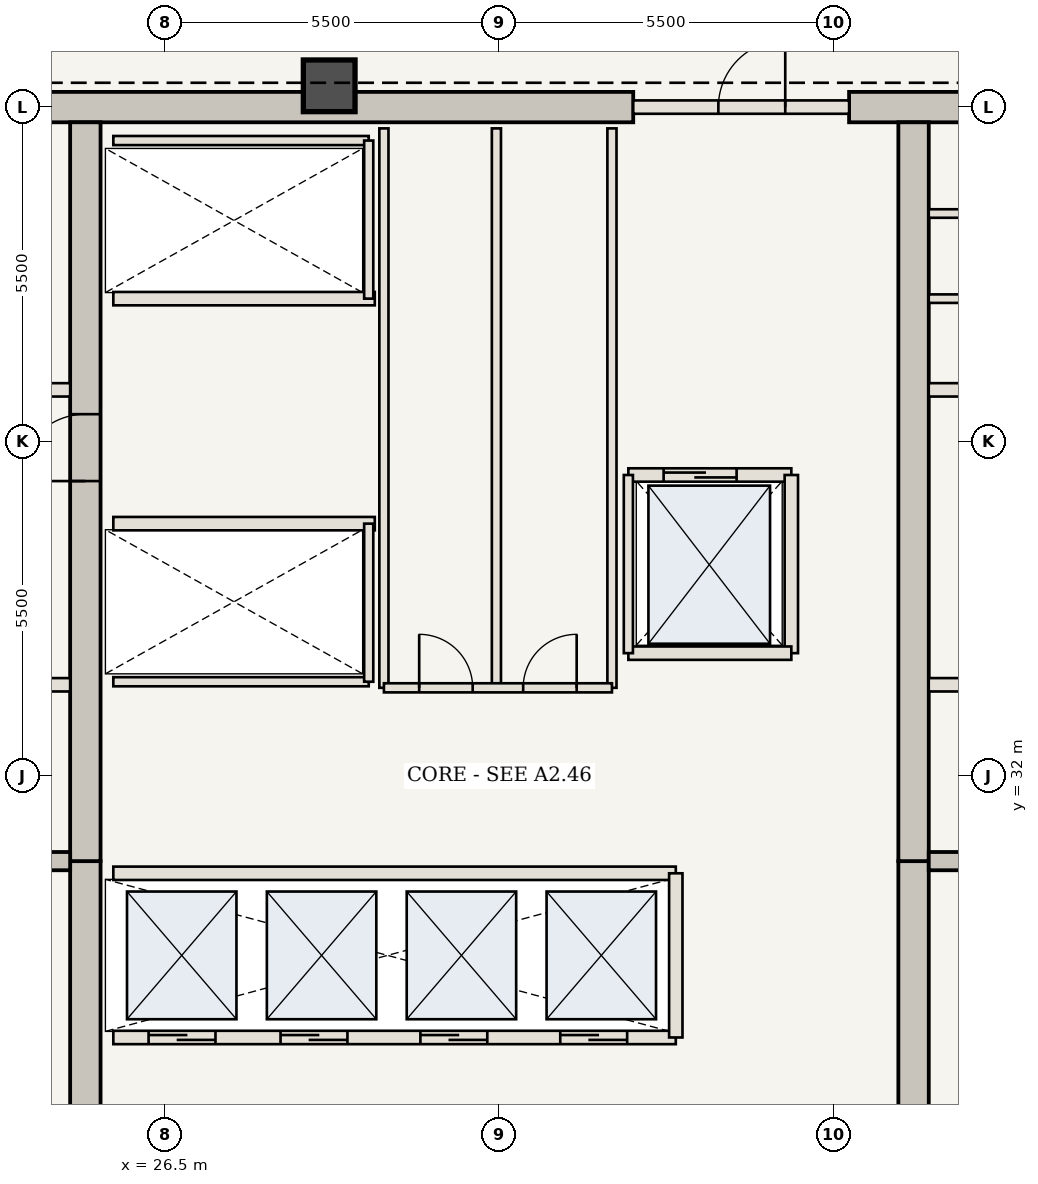
"""IFC4 building model, lengths in metres.
Left out: names, types, materials, properties, quantities, classifications, styles, units other than length and angle.
Written with IfcOpenShell. Run it as: python <this file> out.ifc"""

import sys

from ifc_helpers import new_model, si_unit, direction, frame, frame_2d, origin, origin_2d, place, context, subcontext, project, spatial, rectangle, extrude, element, fill, save


model = new_model("IFC4")
c1 = context("Model", 3, precision=1e-05, world=origin(), true_north=direction((0.0, 1.0)))
c2 = subcontext(c1, "Body", "Model", "MODEL_VIEW")
j1 = project(units=[si_unit("LENGTHUNIT", "METRE"), si_unit("PLANEANGLEUNIT", "RADIAN")], contexts=[c1])
p1 = place(None, origin())
s1 = spatial("IfcSite", under=j1, at=p1, CompositionType="ELEMENT")
p2 = place(p1, origin())
s2 = spatial("IfcBuilding", under=s1, at=p2, CompositionType="ELEMENT")
p3 = place(p2, frame((0.0, 0.0, 206.15)))
s3 = spatial("IfcBuildingStorey", under=s2, at=p3, CompositionType="ELEMENT", Elevation=206.15)
p4 = place(p3, frame((21.41, 43.0, 0.0), z_axis=(0.0, 0.0, 1.0), x_axis=(1.0, 0.0, 0.0)))
e1 = element("IfcWall", 1, at=p4, inside=s3, PredefinedType="SHEAR", context=c2, shape_type="SweptSolid", body=[
    extrude(rectangle(XDim=12.79, YDim=0.5, at=frame_2d((6.395, 0.0))), origin(), (0.0, 0.0, 1.0), 3.85),
])
p5 = place(p3, frame((37.75, 43.0, 0.0), z_axis=(0.0, 0.0, 1.0), x_axis=(1.0, 0.0, 0.0)))
e2 = element("IfcWall", 2, at=p5, inside=s3, PredefinedType="SHEAR", context=c2, shape_type="SweptSolid", body=[
    extrude(rectangle(XDim=4.84, YDim=0.5, at=frame_2d((2.42, 0.0))), origin(), (0.0, 0.0, 1.0), 3.85),
])
p6 = place(p3, frame((25.19, 21.2, 0.0), z_axis=(0.0, 0.0, 1.0), x_axis=(0.0, 1.0, 0.0)))
e3 = element("IfcWall", 3, at=p6, inside=s3, PredefinedType="SHEAR", context=c2, shape_type="SweptSolid", body=[
    extrude(rectangle(XDim=9.4, YDim=0.5, at=frame_2d((4.7, 0.0))), origin(), (0.0, 0.0, 1.0), 3.85),
])
p7 = place(p3, frame((25.19, 30.6, 0.0), z_axis=(0.0, 0.0, 1.0), x_axis=(0.0, 1.0, 0.0)))
e4 = element("IfcWall", 4, at=p7, inside=s3, PredefinedType="SHEAR", context=c2, shape_type="SweptSolid", body=[
    extrude(rectangle(XDim=12.15, YDim=0.5, at=frame_2d((6.075, 0.0))), origin(), (0.0, 0.0, 1.0), 3.85),
])
p8 = place(p7, frame((6.25, 0.0, 0.0)))
e5 = element("IfcOpeningElement", 5, at=p8, cuts=e4, PredefinedType="OPENING", context=c2, shape_type="SweptSolid", body=[
    extrude(rectangle(XDim=1.1, YDim=2.15, at=frame_2d((0.55, 1.075))), frame((0.0, 0.26, 0.0), z_axis=(0.0, -1.0, 0.0), x_axis=(1.0, 0.0, 0.0)), (0.0, 0.0, 1.0), 0.52),
])
p9 = place(p3, frame((38.81, 21.2, 0.0), z_axis=(0.0, 0.0, 1.0), x_axis=(0.0, 1.0, 0.0)))
e6 = element("IfcWall", 6, at=p9, inside=s3, PredefinedType="SHEAR", context=c2, shape_type="SweptSolid", body=[
    extrude(rectangle(XDim=9.4, YDim=0.5, at=frame_2d((4.7, 0.0))), origin(), (0.0, 0.0, 1.0), 3.85),
])
p10 = place(p3, frame((38.81, 30.6, 0.0), z_axis=(0.0, 0.0, 1.0), x_axis=(0.0, 1.0, 0.0)))
e7 = element("IfcWall", 7, at=p10, inside=s3, PredefinedType="SHEAR", context=c2, shape_type="SweptSolid", body=[
    extrude(rectangle(XDim=12.15, YDim=0.5, at=frame_2d((6.075, 0.0))), origin(), (0.0, 0.0, 1.0), 3.85),
])
p11 = place(p3, frame((29.2, 43.35, 0.0), z_axis=(0.0, 0.0, 1.0), x_axis=(1.0, 0.0, 0.0)))
e8 = element("IfcColumn", 8, at=p11, inside=s3, PredefinedType="COLUMN", context=c2, shape_type="SweptSolid", body=[
    extrude(rectangle(XDim=0.85, YDim=0.85, at=origin_2d()), origin(), (0.0, 0.0, 1.0), 3.85),
])
for number, where, z_axis, x_axis in (
    (9, (21.41, 30.6, 0.0), (0.0, 0.0, 1.0), (1.0, 0.0, 0.0)),
    (10, (39.06, 30.6, 0.0), (0.0, 0.0, 1.0), (1.0, 0.0, 0.0)),
):
    element("IfcWall", number, at=place(p3, frame(where, z_axis=z_axis, x_axis=x_axis)), inside=s3, PredefinedType="SHEAR", context=c2, shape_type="SweptSolid", body=[
        extrude(rectangle(XDim=3.53, YDim=0.3, at=frame_2d((1.765, 0.0))), origin(), (0.0, 0.0, 1.0), 3.685),
    ])
p12 = place(p3, frame((21.41, 33.5, 0.0), z_axis=(0.0, 0.0, 1.0), x_axis=(1.0, 0.0, 0.0)))
e11 = element("IfcWall", 11, at=p12, inside=s3, PredefinedType="STANDARD", context=c2, shape_type="SweptSolid", body=[
    extrude(rectangle(XDim=3.53, YDim=0.22, at=frame_2d((1.765, 0.0))), origin(), (0.0, 0.0, 1.0), 3.685),
])
p13 = place(p12, frame((0.75, 0.0, 0.0)))
e12 = element("IfcOpeningElement", 12, at=p13, cuts=e11, PredefinedType="OPENING", context=c2, shape_type="SweptSolid", body=[
    extrude(rectangle(XDim=1.2, YDim=2.2, at=frame_2d((0.6, 1.1))), frame((0.0, 0.12, 0.0), z_axis=(0.0, -1.0, 0.0), x_axis=(1.0, 0.0, 0.0)), (0.0, 0.0, 1.0), 0.24),
])
p14 = place(p3, frame((39.06, 33.5, 0.0), z_axis=(0.0, 0.0, 1.0), x_axis=(1.0, 0.0, 0.0)))
e13 = element("IfcWall", 13, at=p14, inside=s3, PredefinedType="STANDARD", context=c2, shape_type="SweptSolid", body=[
    extrude(rectangle(XDim=3.53, YDim=0.22, at=frame_2d((1.765, 0.0))), origin(), (0.0, 0.0, 1.0), 3.685),
])
p15 = place(p14, frame((1.55, 0.0, 0.0)))
e14 = element("IfcOpeningElement", 14, at=p15, cuts=e13, PredefinedType="OPENING", context=c2, shape_type="SweptSolid", body=[
    extrude(rectangle(XDim=1.2, YDim=2.2, at=frame_2d((0.6, 1.1))), frame((0.0, 0.12, 0.0), z_axis=(0.0, -1.0, 0.0), x_axis=(1.0, 0.0, 0.0)), (0.0, 0.0, 1.0), 0.24),
])
for number, where, z_axis, x_axis in (
    (15, (21.41, 38.35, 0.0), (0.0, 0.0, 1.0), (1.0, 0.0, 0.0)),
    (16, (39.06, 38.35, 0.0), (0.0, 0.0, 1.0), (1.0, 0.0, 0.0)),
):
    element("IfcWall", number, at=place(p3, frame(where, z_axis=z_axis, x_axis=x_axis)), inside=s3, PredefinedType="STANDARD", context=c2, shape_type="SweptSolid", body=[
        extrude(rectangle(XDim=3.53, YDim=0.22, at=frame_2d((1.765, 0.0))), origin(), (0.0, 0.0, 1.0), 3.685),
    ])
for number, where, z_axis, x_axis in (
    (17, (39.06, 39.85, 0.0), (0.0, 0.0, 1.0), (1.0, 0.0, 0.0)),
    (18, (39.06, 41.25, 0.0), (0.0, 0.0, 1.0), (1.0, 0.0, 0.0)),
):
    element("IfcWall", number, at=place(p3, frame(where, z_axis=z_axis, x_axis=x_axis)), inside=s3, PredefinedType="STANDARD", context=c2, shape_type="SweptSolid", body=[
        extrude(rectangle(XDim=3.53, YDim=0.14, at=frame_2d((1.765, 0.0))), origin(), (0.0, 0.0, 1.0), 3.685),
    ])
p16 = place(p3, frame((25.65, 27.7, 0.0), z_axis=(0.0, 0.0, 1.0), x_axis=(1.0, 0.0, 0.0)))
e19 = element("IfcWall", 19, at=p16, inside=s3, PredefinedType="STANDARD", context=c2, shape_type="SweptSolid", body=[
    extrude(rectangle(XDim=9.25, YDim=0.22, at=frame_2d((4.625, 0.0))), origin(), (0.0, 0.0, 1.0), 3.685),
])
p17 = place(p16, frame((0.58, 0.0, 0.0)))
e20 = element("IfcOpeningElement", 20, at=p17, cuts=e19, PredefinedType="OPENING", context=c2, shape_type="SweptSolid", body=[
    extrude(rectangle(XDim=1.1, YDim=2.15, at=frame_2d((0.55, 1.075))), frame((0.0, 0.12, 0.0), z_axis=(0.0, -1.0, 0.0), x_axis=(1.0, 0.0, 0.0)), (0.0, 0.0, 1.0), 0.24),
])
p18 = place(p16, frame((2.75, 0.0, 0.0)))
e21 = element("IfcOpeningElement", 21, at=p18, cuts=e19, PredefinedType="OPENING", context=c2, shape_type="SweptSolid", body=[
    extrude(rectangle(XDim=1.1, YDim=2.15, at=frame_2d((0.55, 1.075))), frame((0.0, 0.12, 0.0), z_axis=(0.0, -1.0, 0.0), x_axis=(1.0, 0.0, 0.0)), (0.0, 0.0, 1.0), 0.24),
])
p19 = place(p16, frame((5.05, 0.0, 0.0)))
e22 = element("IfcOpeningElement", 22, at=p19, cuts=e19, PredefinedType="OPENING", context=c2, shape_type="SweptSolid", body=[
    extrude(rectangle(XDim=1.1, YDim=2.15, at=frame_2d((0.55, 1.075))), frame((0.0, 0.12, 0.0), z_axis=(0.0, -1.0, 0.0), x_axis=(1.0, 0.0, 0.0)), (0.0, 0.0, 1.0), 0.24),
])
p20 = place(p16, frame((7.35, 0.0, 0.0)))
e23 = element("IfcOpeningElement", 23, at=p20, cuts=e19, PredefinedType="OPENING", context=c2, shape_type="SweptSolid", body=[
    extrude(rectangle(XDim=1.1, YDim=2.15, at=frame_2d((0.55, 1.075))), frame((0.0, 0.12, 0.0), z_axis=(0.0, -1.0, 0.0), x_axis=(1.0, 0.0, 0.0)), (0.0, 0.0, 1.0), 0.24),
])
p21 = place(p3, frame((25.65, 30.4, 0.0), z_axis=(0.0, 0.0, 1.0), x_axis=(1.0, 0.0, 0.0)))
e24 = element("IfcWall", 24, at=p21, inside=s3, PredefinedType="STANDARD", context=c2, shape_type="SweptSolid", body=[
    extrude(rectangle(XDim=9.25, YDim=0.22, at=frame_2d((4.625, 0.0))), origin(), (0.0, 0.0, 1.0), 3.685),
])
p22 = place(p3, frame((34.9, 27.7, 0.0), z_axis=(0.0, 0.0, 1.0), x_axis=(0.0, 1.0, 0.0)))
e25 = element("IfcWall", 25, at=p22, inside=s3, PredefinedType="STANDARD", context=c2, shape_type="SweptSolid", body=[
    extrude(rectangle(XDim=2.7, YDim=0.22, at=frame_2d((1.35, 0.0))), origin(), (0.0, 0.0, 1.0), 3.685),
])
p23 = place(p3, frame((25.65, 36.15, 0.0), z_axis=(0.0, 0.0, 1.0), x_axis=(1.0, 0.0, 0.0)))
e26 = element("IfcWall", 26, at=p23, inside=s3, PredefinedType="STANDARD", context=c2, shape_type="SweptSolid", body=[
    extrude(rectangle(XDim=4.3, YDim=0.22, at=frame_2d((2.15, 0.0))), origin(), (0.0, 0.0, 1.0), 3.685),
])
p24 = place(p3, frame((25.65, 33.55, 0.0), z_axis=(0.0, 0.0, 1.0), x_axis=(1.0, 0.0, 0.0)))
e27 = element("IfcWall", 27, at=p24, inside=s3, PredefinedType="STANDARD", context=c2, shape_type="SweptSolid", body=[
    extrude(rectangle(XDim=4.2, YDim=0.15, at=frame_2d((2.1, 0.0))), origin(), (0.0, 0.0, 1.0), 3.685),
])
p25 = place(p3, frame((29.85, 33.55, 0.0), z_axis=(0.0, 0.0, 1.0), x_axis=(0.0, 1.0, 0.0)))
e28 = element("IfcWall", 28, at=p25, inside=s3, PredefinedType="STANDARD", context=c2, shape_type="SweptSolid", body=[
    extrude(rectangle(XDim=2.6, YDim=0.15, at=frame_2d((1.3, 0.0))), origin(), (0.0, 0.0, 1.0), 3.685),
])
p26 = place(p3, frame((25.65, 39.85, 0.0), z_axis=(0.0, 0.0, 1.0), x_axis=(1.0, 0.0, 0.0)))
e29 = element("IfcWall", 29, at=p26, inside=s3, PredefinedType="STANDARD", context=c2, shape_type="SweptSolid", body=[
    extrude(rectangle(XDim=4.3, YDim=0.22, at=frame_2d((2.15, 0.0))), origin(), (0.0, 0.0, 1.0), 3.685),
])
p27 = place(p3, frame((25.65, 42.45, 0.0), z_axis=(0.0, 0.0, 1.0), x_axis=(1.0, 0.0, 0.0)))
e30 = element("IfcWall", 30, at=p27, inside=s3, PredefinedType="STANDARD", context=c2, shape_type="SweptSolid", body=[
    extrude(rectangle(XDim=4.2, YDim=0.15, at=frame_2d((2.1, 0.0))), origin(), (0.0, 0.0, 1.0), 3.685),
])
p28 = place(p3, frame((29.85, 39.85, 0.0), z_axis=(0.0, 0.0, 1.0), x_axis=(0.0, 1.0, 0.0)))
e31 = element("IfcWall", 31, at=p28, inside=s3, PredefinedType="STANDARD", context=c2, shape_type="SweptSolid", body=[
    extrude(rectangle(XDim=2.6, YDim=0.15, at=frame_2d((1.3, 0.0))), origin(), (0.0, 0.0, 1.0), 3.685),
])
for number, where, z_axis, x_axis in (
    (32, (30.1, 33.45, 0.0), (0.0, 0.0, 1.0), (0.0, 1.0, 0.0)),
    (33, (31.95, 33.45, 0.0), (0.0, 0.0, 1.0), (0.0, 1.0, 0.0)),
    (34, (33.85, 33.45, 0.0), (0.0, 0.0, 1.0), (0.0, 1.0, 0.0)),
):
    element("IfcWall", number, at=place(p3, frame(where, z_axis=z_axis, x_axis=x_axis)), inside=s3, PredefinedType="STANDARD", context=c2, shape_type="SweptSolid", body=[
        extrude(rectangle(XDim=9.2, YDim=0.15, at=frame_2d((4.6, 0.0))), origin(), (0.0, 0.0, 1.0), 3.685),
    ])
p29 = place(p3, frame((30.1, 33.45, 0.0), z_axis=(0.0, 0.0, 1.0), x_axis=(1.0, 0.0, 0.0)))
e35 = element("IfcWall", 35, at=p29, inside=s3, PredefinedType="STANDARD", context=c2, shape_type="SweptSolid", body=[
    extrude(rectangle(XDim=3.75, YDim=0.15, at=frame_2d((1.875, 0.0))), origin(), (0.0, 0.0, 1.0), 3.685),
])
p30 = place(p29, frame((0.58, 0.0, 0.0)))
e36 = element("IfcOpeningElement", 36, at=p30, cuts=e35, PredefinedType="OPENING", context=c2, shape_type="SweptSolid", body=[
    extrude(rectangle(XDim=0.88, YDim=2.1, at=frame_2d((0.44, 1.05))), frame((0.0, 0.085, 0.0), z_axis=(0.0, -1.0, 0.0), x_axis=(1.0, 0.0, 0.0)), (0.0, 0.0, 1.0), 0.17),
])
p31 = place(p29, frame((2.29, 0.0, 0.0)))
e37 = element("IfcOpeningElement", 37, at=p31, cuts=e35, PredefinedType="OPENING", context=c2, shape_type="SweptSolid", body=[
    extrude(rectangle(XDim=0.88, YDim=2.1, at=frame_2d((0.44, 1.05))), frame((0.0, 0.085, 0.0), z_axis=(0.0, -1.0, 0.0), x_axis=(1.0, 0.0, 0.0)), (0.0, 0.0, 1.0), 0.17),
])
p32 = place(p3, frame((34.2, 43.0, 0.0), z_axis=(0.0, 0.0, 1.0), x_axis=(1.0, 0.0, 0.0)))
e38 = element("IfcWall", 38, at=p32, inside=s3, PredefinedType="STANDARD", context=c2, shape_type="SweptSolid", body=[
    extrude(rectangle(XDim=3.55, YDim=0.22, at=frame_2d((1.775, 0.0))), origin(), (0.0, 0.0, 1.0), 3.685),
])
p33 = place(p32, frame((1.4, 0.0, 0.0)))
e39 = element("IfcOpeningElement", 39, at=p33, cuts=e38, PredefinedType="OPENING", context=c2, shape_type="SweptSolid", body=[
    extrude(rectangle(XDim=1.1, YDim=2.15, at=frame_2d((0.55, 1.075))), frame((0.0, 0.12, 0.0), z_axis=(0.0, -1.0, 0.0), x_axis=(1.0, 0.0, 0.0)), (0.0, 0.0, 1.0), 0.24),
])
p34 = place(p3, frame((34.12, 36.95, 0.0), z_axis=(0.0, 0.0, 1.0), x_axis=(1.0, 0.0, 0.0)))
e40 = element("IfcWall", 40, at=p34, inside=s3, PredefinedType="STANDARD", context=c2, shape_type="SweptSolid", body=[
    extrude(rectangle(XDim=2.68, YDim=0.22, at=frame_2d((1.34, 0.0))), origin(), (0.0, 0.0, 1.0), 3.685),
])
p35 = place(p34, frame((0.58, 0.0, 0.0)))
e41 = element("IfcOpeningElement", 41, at=p35, cuts=e40, PredefinedType="OPENING", context=c2, shape_type="SweptSolid", body=[
    extrude(rectangle(XDim=1.2, YDim=2.2, at=frame_2d((0.6, 1.1))), frame((0.0, 0.12, 0.0), z_axis=(0.0, -1.0, 0.0), x_axis=(1.0, 0.0, 0.0)), (0.0, 0.0, 1.0), 0.24),
])
p36 = place(p3, frame((36.8, 34.02, 0.0), z_axis=(0.0, 0.0, 1.0), x_axis=(0.0, 1.0, 0.0)))
e42 = element("IfcWall", 42, at=p36, inside=s3, PredefinedType="STANDARD", context=c2, shape_type="SweptSolid", body=[
    extrude(rectangle(XDim=2.93, YDim=0.22, at=frame_2d((1.465, 0.0))), origin(), (0.0, 0.0, 1.0), 3.685),
])
p37 = place(p3, frame((34.12, 34.02, 0.0), z_axis=(0.0, 0.0, 1.0), x_axis=(1.0, 0.0, 0.0)))
e43 = element("IfcWall", 43, at=p37, inside=s3, PredefinedType="STANDARD", context=c2, shape_type="SweptSolid", body=[
    extrude(rectangle(XDim=2.68, YDim=0.22, at=frame_2d((1.34, 0.0))), origin(), (0.0, 0.0, 1.0), 3.685),
])
p38 = place(p3, frame((34.12, 34.02, 0.0), z_axis=(0.0, 0.0, 1.0), x_axis=(0.0, 1.0, 0.0)))
e44 = element("IfcWall", 44, at=p38, inside=s3, PredefinedType="STANDARD", context=c2, shape_type="SweptSolid", body=[
    extrude(rectangle(XDim=2.93, YDim=0.15, at=frame_2d((1.465, 0.0))), origin(), (0.0, 0.0, 1.0), 3.685),
])
p39 = place(p8, origin())
e45 = element("IfcDoor", 45, at=p39, inside=s3, OperationType="SINGLE_SWING_LEFT", PredefinedType="DOOR", context=c2, shape_type="SweptSolid", body=[
    extrude(rectangle(XDim=1.1, YDim=2.15, at=frame_2d((0.55, 1.075))), frame((0.0, 0.025, 0.0), z_axis=(0.0, -1.0, 0.0), x_axis=(1.0, 0.0, 0.0)), (0.0, 0.0, 1.0), 0.05),
])
fill(e5, e45)
p40 = place(p17, origin())
e46 = element("IfcDoor", 46, at=p40, inside=s3, OperationType="DOUBLE_DOOR_SLIDING", PredefinedType="DOOR", context=c2, shape_type="SweptSolid", body=[
    extrude(rectangle(XDim=1.1, YDim=2.15, at=frame_2d((0.55, 1.075))), frame((0.0, 0.025, 0.0), z_axis=(0.0, -1.0, 0.0), x_axis=(1.0, 0.0, 0.0)), (0.0, 0.0, 1.0), 0.05),
])
fill(e20, e46)
p41 = place(p18, origin())
e47 = element("IfcDoor", 47, at=p41, inside=s3, OperationType="DOUBLE_DOOR_SLIDING", PredefinedType="DOOR", context=c2, shape_type="SweptSolid", body=[
    extrude(rectangle(XDim=1.1, YDim=2.15, at=frame_2d((0.55, 1.075))), frame((0.0, 0.025, 0.0), z_axis=(0.0, -1.0, 0.0), x_axis=(1.0, 0.0, 0.0)), (0.0, 0.0, 1.0), 0.05),
])
fill(e21, e47)
p42 = place(p19, origin())
e48 = element("IfcDoor", 48, at=p42, inside=s3, OperationType="DOUBLE_DOOR_SLIDING", PredefinedType="DOOR", context=c2, shape_type="SweptSolid", body=[
    extrude(rectangle(XDim=1.1, YDim=2.15, at=frame_2d((0.55, 1.075))), frame((0.0, 0.025, 0.0), z_axis=(0.0, -1.0, 0.0), x_axis=(1.0, 0.0, 0.0)), (0.0, 0.0, 1.0), 0.05),
])
fill(e22, e48)
p43 = place(p20, origin())
e49 = element("IfcDoor", 49, at=p43, inside=s3, OperationType="DOUBLE_DOOR_SLIDING", PredefinedType="DOOR", context=c2, shape_type="SweptSolid", body=[
    extrude(rectangle(XDim=1.1, YDim=2.15, at=frame_2d((0.55, 1.075))), frame((0.0, 0.025, 0.0), z_axis=(0.0, -1.0, 0.0), x_axis=(1.0, 0.0, 0.0)), (0.0, 0.0, 1.0), 0.05),
])
fill(e23, e49)
p44 = place(p30, origin())
e50 = element("IfcDoor", 50, at=p44, inside=s3, OperationType="SINGLE_SWING_LEFT", PredefinedType="DOOR", context=c2, shape_type="SweptSolid", body=[
    extrude(rectangle(XDim=0.88, YDim=2.1, at=frame_2d((0.44, 1.05))), frame((0.0, 0.025, 0.0), z_axis=(0.0, -1.0, 0.0), x_axis=(1.0, 0.0, 0.0)), (0.0, 0.0, 1.0), 0.05),
])
fill(e36, e50)
p45 = place(p31, origin())
e51 = element("IfcDoor", 51, at=p45, inside=s3, OperationType="SINGLE_SWING_RIGHT", PredefinedType="DOOR", context=c2, shape_type="SweptSolid", body=[
    extrude(rectangle(XDim=0.88, YDim=2.1, at=frame_2d((0.44, 1.05))), frame((0.0, 0.025, 0.0), z_axis=(0.0, -1.0, 0.0), x_axis=(1.0, 0.0, 0.0)), (0.0, 0.0, 1.0), 0.05),
])
fill(e37, e51)
p46 = place(p33, origin())
e52 = element("IfcDoor", 52, at=p46, inside=s3, OperationType="SINGLE_SWING_RIGHT", PredefinedType="DOOR", context=c2, shape_type="SweptSolid", body=[
    extrude(rectangle(XDim=1.1, YDim=2.15, at=frame_2d((0.55, 1.075))), frame((0.0, 0.025, 0.0), z_axis=(0.0, -1.0, 0.0), x_axis=(1.0, 0.0, 0.0)), (0.0, 0.0, 1.0), 0.05),
])
fill(e39, e52)
p47 = place(p35, origin())
e53 = element("IfcDoor", 53, at=p47, inside=s3, OperationType="DOUBLE_DOOR_SLIDING", PredefinedType="DOOR", context=c2, shape_type="SweptSolid", body=[
    extrude(rectangle(XDim=1.2, YDim=2.2, at=frame_2d((0.6, 1.1))), frame((0.0, 0.025, 0.0), z_axis=(0.0, -1.0, 0.0), x_axis=(1.0, 0.0, 0.0)), (0.0, 0.0, 1.0), 0.05),
])
fill(e41, e53)
save(model, sys.argv[1])
